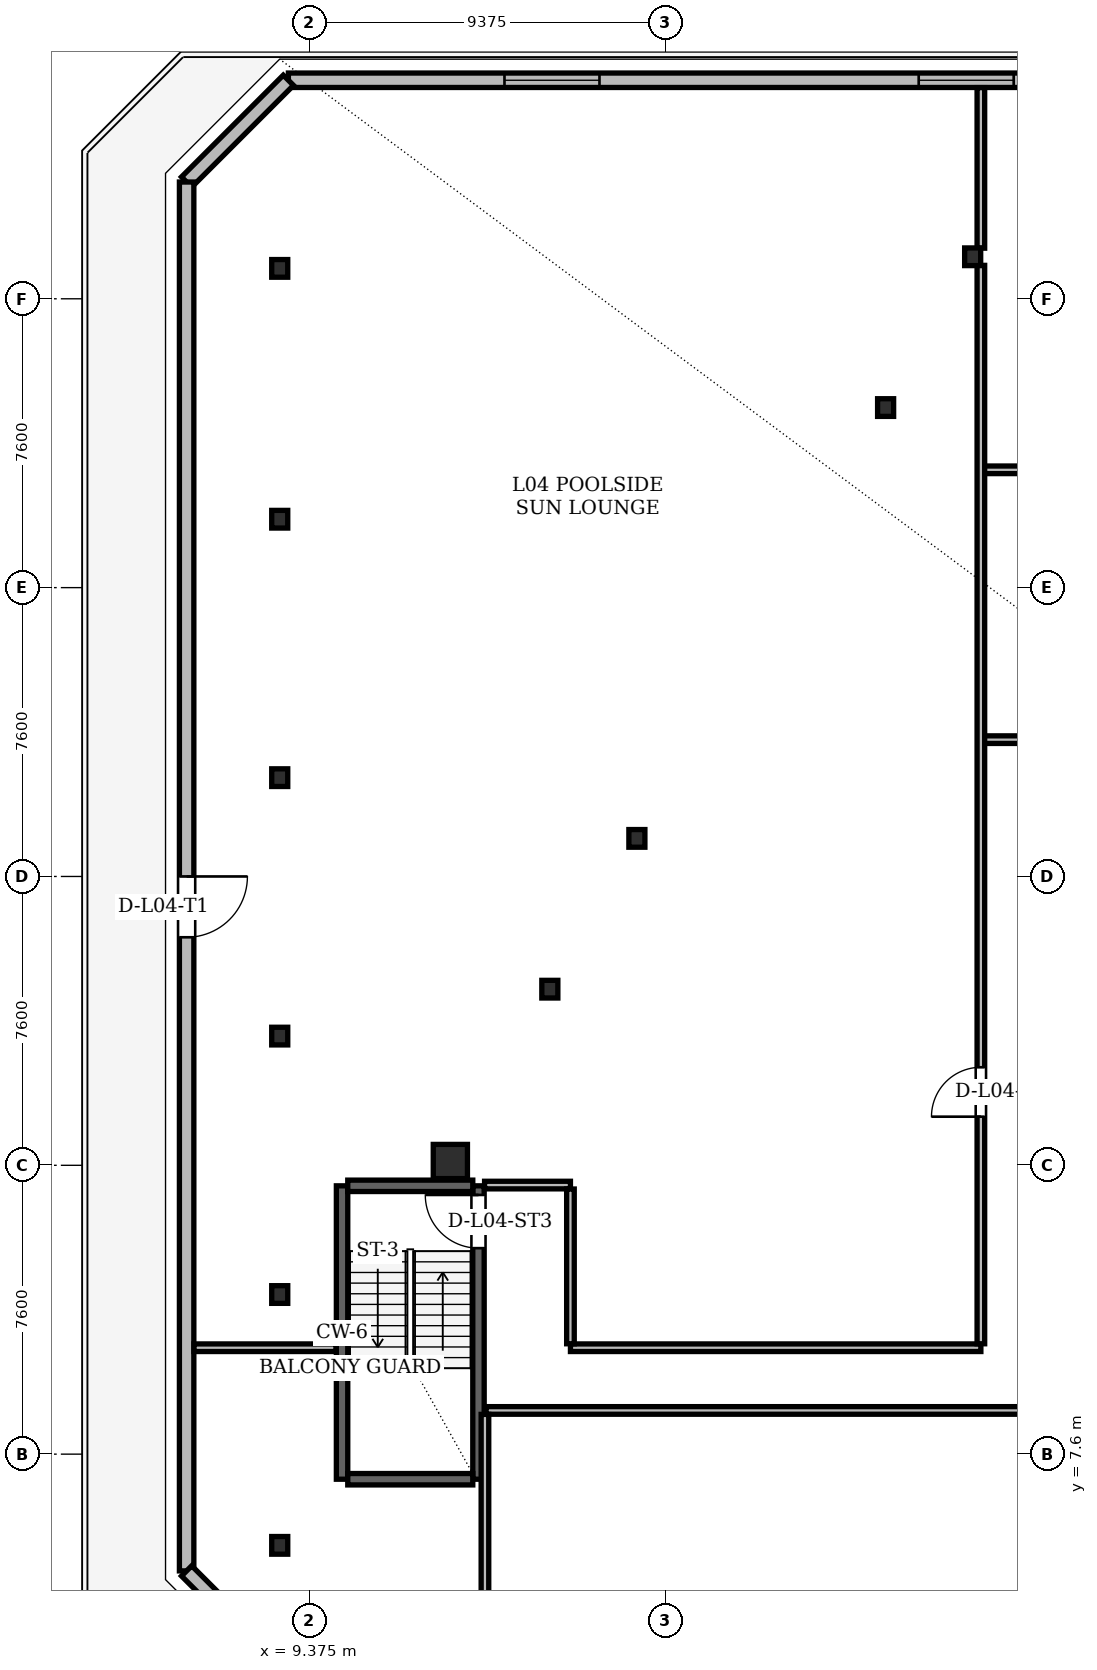
"""IFC4 building model, lengths in metres.
Left out: names, types, materials, properties, quantities, classifications, styles, units other than length and angle.
Written with IfcOpenShell. Run it as: python <this file> out.ifc"""

import sys

from ifc_helpers import new_model, si_unit, direction, frame, frame_2d, origin, origin_2d, place, context, subcontext, project, spatial, rectangle, hollow_rectangle, i_section, extrude, element, fill, save


model = new_model("IFC4")
c1 = context("Model", 3, precision=1e-05, world=origin(), true_north=direction((0.0, 1.0)))
c2 = subcontext(c1, "Body", "Model", "MODEL_VIEW")
j1 = project(units=[si_unit("LENGTHUNIT", "METRE"), si_unit("PLANEANGLEUNIT", "RADIAN")], contexts=[c1])
p1 = place(None, origin())
s1 = spatial("IfcSite", under=j1, at=p1, CompositionType="ELEMENT")
p2 = place(p1, origin())
s2 = spatial("IfcBuilding", under=s1, at=p2, CompositionType="ELEMENT")
p3 = place(p2, frame((0.0, 0.0, 18.3)))
s3 = spatial("IfcBuildingStorey", under=s2, at=p3, CompositionType="ELEMENT", Elevation=18.3)
p4 = place(p3, frame((13.09, 15.3, 0.004), z_axis=(0.0, 0.0, 1.0), x_axis=(1.0, 0.0, 0.0)))
e1 = element("IfcColumn", 1, at=p4, inside=s3, PredefinedType="COLUMN", context=c2, shape_type="SweptSolid", body=[
    extrude(hollow_rectangle(XDim=0.9, YDim=0.9, WallThickness=0.075, at=origin_2d()), origin(), (0.0, 0.0, 1.0), 4.191),
])
for number, where, z_axis, x_axis in (
    (2, (26.834, 39.106, 0.004), (0.0, 0.0, 1.0), (1.0, 0.0, 0.0)),
    (3, (24.543, 35.138, 0.004), (0.0, 0.0, 1.0), (1.0, 0.0, 0.0)),
    (4, (17.998, 23.802, 0.004), (0.0, 0.0, 1.0), (1.0, 0.0, 0.0)),
    (5, (15.708, 19.834, 0.004), (0.0, 0.0, 1.0), (1.0, 0.0, 0.0)),
):
    element("IfcColumn", number, at=place(p3, frame(where, z_axis=z_axis, x_axis=x_axis)), inside=s3, PredefinedType="COLUMN", context=c2, shape_type="SweptSolid", body=[
        extrude(i_section(OverallWidth=0.422, OverallDepth=0.465, WebThickness=0.045, FlangeThickness=0.072, at=origin_2d()), origin(), (0.0, 0.0, 1.0), 4.191),
    ])
for number, where, z_axis, x_axis in (
    (6, (8.6, 5.2, 0.0), (0.0, 0.0, 1.0), (1.0, 0.0, 0.0)),
    (7, (8.6, 11.8, 0.0), (0.0, 0.0, 1.0), (1.0, 0.0, 0.0)),
    (8, (8.6, 18.6, 0.0), (0.0, 0.0, 1.0), (1.0, 0.0, 0.0)),
    (9, (8.6, 25.4, 0.0), (0.0, 0.0, 1.0), (1.0, 0.0, 0.0)),
    (10, (8.6, 32.2, 0.0), (0.0, 0.0, 1.0), (1.0, 0.0, 0.0)),
    (11, (8.6, 38.8, 0.0), (0.0, 0.0, 1.0), (1.0, 0.0, 0.0)),
):
    element("IfcColumn", number, at=place(p3, frame(where, z_axis=z_axis, x_axis=x_axis)), inside=s3, PredefinedType="COLUMN", context=c2, shape_type="SweptSolid", body=[
        extrude(i_section(OverallWidth=0.422, OverallDepth=0.465, WebThickness=0.045, FlangeThickness=0.072, at=origin_2d()), origin(), (0.0, 0.0, 1.0), 4.2),
    ])
p5 = place(p3, frame((10.24, 6.94, 0.0), z_axis=(0.0, 0.0, 1.0), x_axis=(0.0, 1.0, 0.0)))
e12 = element("IfcWall", 12, at=p5, inside=s3, PredefinedType="SHEAR", context=c2, shape_type="SweptSolid", body=[
    extrude(rectangle(XDim=7.72, YDim=0.3, at=frame_2d((3.86, 0.0))), origin(), (0.0, 0.0, 1.0), 3.88),
])
p6 = place(p3, frame((13.83, 6.94, 0.0), z_axis=(0.0, 0.0, 1.0), x_axis=(0.0, 1.0, 0.0)))
e13 = element("IfcWall", 13, at=p6, inside=s3, PredefinedType="SHEAR", context=c2, shape_type="SweptSolid", body=[
    extrude(rectangle(XDim=7.72, YDim=0.3, at=frame_2d((3.86, 0.0))), origin(), (0.0, 0.0, 1.0), 3.88),
])
p7 = place(p6, frame((6.08, 0.0, 0.0)))
e14 = element("IfcOpeningElement", 14, at=p7, cuts=e13, PredefinedType="OPENING", context=c2, shape_type="SweptSolid", body=[
    extrude(rectangle(XDim=1.4, YDim=2.2, at=frame_2d((0.7, 1.1))), frame((0.0, 0.15, 0.0), z_axis=(0.0, -1.0, 0.0), x_axis=(1.0, 0.0, 0.0)), (0.0, 0.0, 1.0), 0.3),
])
for number, where, z_axis, x_axis in (
    (15, (10.39, 6.94, 0.0), (0.0, 0.0, 1.0), (1.0, 0.0, 0.0)),
    (16, (10.39, 14.66, 0.0), (0.0, 0.0, 1.0), (1.0, 0.0, 0.0)),
):
    element("IfcWall", number, at=place(p3, frame(where, z_axis=z_axis, x_axis=x_axis)), inside=s3, PredefinedType="SHEAR", context=c2, shape_type="SweptSolid", body=[
        extrude(rectangle(XDim=3.29, YDim=0.3, at=frame_2d((1.645, 0.0))), origin(), (0.0, 0.0, 1.0), 3.88),
    ])
p8 = place(p3, frame((33.6, 43.75, 0.0), z_axis=(0.0, 0.0, 1.0), x_axis=(-1.0, 0.0, 0.0)))
e17 = element("IfcWall", 17, at=p8, inside=s3, PredefinedType="SOLIDWALL", context=c2, shape_type="SweptSolid", body=[
    extrude(rectangle(XDim=24.772, YDim=0.38, at=frame_2d((12.386, 0.0))), origin(), (0.0, 0.0, 1.0), 2.943),
])
p9 = place(p8, frame((5.686, 0.0, 0.85)))
e18 = element("IfcOpeningElement", 18, at=p9, cuts=e17, PredefinedType="OPENING", context=c2, shape_type="SweptSolid", body=[
    extrude(rectangle(XDim=2.5, YDim=1.923, at=frame_2d((1.25, 0.961))), frame((0.0, 0.19, 0.0), z_axis=(0.0, -1.0, 0.0), x_axis=(1.0, 0.0, 0.0)), (0.0, 0.0, 1.0), 0.38),
])
p10 = place(p8, frame((16.586, 0.0, 0.85)))
e19 = element("IfcOpeningElement", 19, at=p10, cuts=e17, PredefinedType="OPENING", context=c2, shape_type="SweptSolid", body=[
    extrude(rectangle(XDim=2.5, YDim=1.923, at=frame_2d((1.25, 0.961))), frame((0.0, 0.19, 0.0), z_axis=(0.0, -1.0, 0.0), x_axis=(1.0, 0.0, 0.0)), (0.0, 0.0, 1.0), 0.38),
])
p11 = place(p3, frame((8.828, 43.75, 0.0), z_axis=(0.0, 0.0, 1.0), x_axis=(-0.707139013974, -0.707074546929, 0.0)))
e20 = element("IfcWall", 20, at=p11, inside=s3, PredefinedType="SOLIDWALL", context=c2, shape_type="SweptSolid", body=[
    extrude(rectangle(XDim=3.787, YDim=0.38, at=frame_2d((1.894, 0.0))), origin(), (0.0, 0.0, 1.0), 3.88),
])
p12 = place(p3, frame((6.15, 41.072, 0.0), z_axis=(0.0, 0.0, 1.0), x_axis=(0.0, -1.0, 0.0)))
e21 = element("IfcWall", 21, at=p12, inside=s3, PredefinedType="SOLIDWALL", context=c2, shape_type="SweptSolid", body=[
    extrude(rectangle(XDim=36.544, YDim=0.38, at=frame_2d((18.272, 0.0))), origin(), (0.0, 0.0, 1.0), 3.88),
])
p13 = place(p12, frame((18.272, 0.0, 0.0)))
e22 = element("IfcOpeningElement", 22, at=p13, cuts=e21, PredefinedType="OPENING", context=c2, shape_type="SweptSolid", body=[
    extrude(rectangle(XDim=1.6, YDim=2.2, at=frame_2d((0.8, 1.1))), frame((0.0, 0.19, 0.0), z_axis=(0.0, -1.0, 0.0), x_axis=(1.0, 0.0, 0.0)), (0.0, 0.0, 1.0), 0.38),
])
p14 = place(p3, frame((6.15, 4.528, 0.0), z_axis=(0.0, 0.0, 1.0), x_axis=(0.707139013974, -0.707074546929, 0.0)))
e23 = element("IfcWall", 23, at=p14, inside=s3, PredefinedType="SOLIDWALL", context=c2, shape_type="SweptSolid", body=[
    extrude(rectangle(XDim=3.787, YDim=0.38, at=frame_2d((1.894, 0.0))), origin(), (0.0, 0.0, 1.0), 3.88),
])
p15 = place(p3, frame((14.03, 8.75, 0.0), z_axis=(0.0, 0.0, 1.0), x_axis=(1.0, 0.0, 0.0)))
e24 = element("IfcWall", 24, at=p15, inside=s3, PredefinedType="PARTITIONING", context=c2, shape_type="SweptSolid", body=[
    extrude(rectangle(XDim=41.57, YDim=0.2, at=frame_2d((20.785, 0.0))), origin(), (0.0, 0.0, 1.0), 2.943),
])
p16 = place(p15, frame((20.035, 0.0, 0.0)))
e25 = element("IfcOpeningElement", 25, at=p16, cuts=e24, PredefinedType="OPENING", context=c2, shape_type="SweptSolid", body=[
    extrude(rectangle(XDim=1.3, YDim=2.2, at=frame_2d((0.65, 1.1))), frame((0.0, 0.1, 0.0), z_axis=(0.0, -1.0, 0.0), x_axis=(1.0, 0.0, 0.0)), (0.0, 0.0, 1.0), 0.2),
])
p17 = place(p3, frame((6.344, 10.4, 0.0), z_axis=(0.0, 0.0, 1.0), x_axis=(1.0, 0.0, 0.0)))
e26 = element("IfcWall", 26, at=p17, inside=s3, PredefinedType="PARTITIONING", context=c2, shape_type="SweptSolid", body=[
    extrude(rectangle(XDim=3.736, YDim=0.2, at=frame_2d((1.868, 0.0))), origin(), (0.0, 0.0, 1.0), 2.943),
])
p18 = place(p3, frame((16.25, 10.4, 0.0), z_axis=(0.0, 0.0, 1.0), x_axis=(1.0, 0.0, 0.0)))
e27 = element("IfcWall", 27, at=p18, inside=s3, PredefinedType="PARTITIONING", context=c2, shape_type="SweptSolid", body=[
    extrude(rectangle(XDim=10.8, YDim=0.2, at=frame_2d((5.4, 0.0))), origin(), (0.0, 0.0, 1.0), 3.88),
])
p19 = place(p3, frame((13.99, 14.68, 0.0), z_axis=(0.0, 0.0, 1.0), x_axis=(1.0, 0.0, 0.0)))
e28 = element("IfcWall", 28, at=p19, inside=s3, PredefinedType="PARTITIONING", context=c2, shape_type="SweptSolid", body=[
    extrude(rectangle(XDim=2.26, YDim=0.2, at=frame_2d((1.13, 0.0))), origin(), (0.0, 0.0, 1.0), 2.943),
])
p20 = place(p3, frame((27.05, 26.4, 0.0), z_axis=(0.0, 0.0, 1.0), x_axis=(1.0, 0.0, 0.0)))
e29 = element("IfcWall", 29, at=p20, inside=s3, PredefinedType="PARTITIONING", context=c2, shape_type="SweptSolid", body=[
    extrude(rectangle(XDim=28.55, YDim=0.2, at=frame_2d((14.275, 0.0))), origin(), (0.0, 0.0, 1.0), 2.943),
])
p21 = place(p20, frame((2.885, 0.0, 0.0)))
e30 = element("IfcOpeningElement", 30, at=p21, cuts=e29, PredefinedType="OPENING", context=c2, shape_type="SweptSolid", body=[
    extrude(rectangle(XDim=0.88, YDim=2.08, at=frame_2d((0.44, 1.04))), frame((0.0, 0.1, 0.0), z_axis=(0.0, -1.0, 0.0), x_axis=(1.0, 0.0, 0.0)), (0.0, 0.0, 1.0), 0.2),
])
p22 = place(p20, frame((8.964, 0.0, 0.0)))
e31 = element("IfcOpeningElement", 31, at=p22, cuts=e29, PredefinedType="OPENING", context=c2, shape_type="SweptSolid", body=[
    extrude(rectangle(XDim=0.88, YDim=2.08, at=frame_2d((0.44, 1.04))), frame((0.0, 0.1, 0.0), z_axis=(0.0, -1.0, 0.0), x_axis=(1.0, 0.0, 0.0)), (0.0, 0.0, 1.0), 0.2),
])
p23 = place(p20, frame((14.688, 0.0, 0.0)))
e32 = element("IfcOpeningElement", 32, at=p23, cuts=e29, PredefinedType="OPENING", context=c2, shape_type="SweptSolid", body=[
    extrude(rectangle(XDim=0.88, YDim=2.08, at=frame_2d((0.44, 1.04))), frame((0.0, 0.1, 0.0), z_axis=(0.0, -1.0, 0.0), x_axis=(1.0, 0.0, 0.0)), (0.0, 0.0, 1.0), 0.2),
])
p24 = place(p3, frame((27.05, 33.5, 0.0), z_axis=(0.0, 0.0, 1.0), x_axis=(1.0, 0.0, 0.0)))
e33 = element("IfcWall", 33, at=p24, inside=s3, PredefinedType="PARTITIONING", context=c2, shape_type="SweptSolid", body=[
    extrude(rectangle(XDim=12.95, YDim=0.2, at=frame_2d((6.475, 0.0))), origin(), (0.0, 0.0, 1.0), 2.943),
])
p25 = place(p3, frame((14.0, 2.044, 0.0), z_axis=(0.0, 0.0, 1.0), x_axis=(0.0, 1.0, 0.0)))
e34 = element("IfcWall", 34, at=p25, inside=s3, PredefinedType="PARTITIONING", context=c2, shape_type="SweptSolid", body=[
    extrude(rectangle(XDim=6.602, YDim=0.2, at=frame_2d((3.301, 0.0))), origin(), (0.0, 0.0, 1.0), 3.88),
])
p26 = place(p3, frame((16.25, 10.504, 0.0), z_axis=(0.0, 0.0, 1.0), x_axis=(0.0, 1.0, 0.0)))
e35 = element("IfcWall", 35, at=p26, inside=s3, PredefinedType="PARTITIONING", context=c2, shape_type="SweptSolid", body=[
    extrude(rectangle(XDim=4.072, YDim=0.2, at=frame_2d((2.036, 0.0))), origin(), (0.0, 0.0, 1.0), 2.943),
])
p27 = place(p3, frame((27.05, 10.504, 0.0), z_axis=(0.0, 0.0, 1.0), x_axis=(0.0, 1.0, 0.0)))
e36 = element("IfcWall", 36, at=p27, inside=s3, PredefinedType="PARTITIONING", context=c2, shape_type="SweptSolid", body=[
    extrude(rectangle(XDim=28.376, YDim=0.2, at=frame_2d((14.188, 0.0))), origin(), (0.0, 0.0, 1.0), 2.943),
])
p28 = place(p27, frame((5.975, 0.0, 0.0)))
e37 = element("IfcOpeningElement", 37, at=p28, cuts=e36, PredefinedType="OPENING", context=c2, shape_type="SweptSolid", body=[
    extrude(rectangle(XDim=1.3, YDim=2.2, at=frame_2d((0.65, 1.1))), frame((0.0, 0.1, 0.0), z_axis=(0.0, -1.0, 0.0), x_axis=(1.0, 0.0, 0.0)), (0.0, 0.0, 1.0), 0.2),
])
p29 = place(p3, frame((27.05, 39.332, 0.0), z_axis=(0.0, 0.0, 1.0), x_axis=(0.0, 1.0, 0.0)))
e38 = element("IfcWall", 38, at=p29, inside=s3, PredefinedType="PARTITIONING", context=c2, shape_type="SweptSolid", body=[
    extrude(rectangle(XDim=4.224, YDim=0.2, at=frame_2d((2.112, 0.0))), origin(), (0.0, 0.0, 1.0), 3.014),
])
p30 = place(p9, origin())
e39 = element("IfcWindow", 39, at=p30, inside=s3, PartitioningType="SINGLE_PANEL", PredefinedType="WINDOW", context=c2, shape_type="SweptSolid", body=[
    extrude(rectangle(XDim=2.5, YDim=1.923, at=frame_2d((1.25, 0.961))), frame((0.0, 0.03, 0.0), z_axis=(0.0, -1.0, 0.0), x_axis=(1.0, 0.0, 0.0)), (0.0, 0.0, 1.0), 0.06),
])
fill(e18, e39)
p31 = place(p10, origin())
e40 = element("IfcWindow", 40, at=p31, inside=s3, PartitioningType="SINGLE_PANEL", PredefinedType="WINDOW", context=c2, shape_type="SweptSolid", body=[
    extrude(rectangle(XDim=2.5, YDim=1.923, at=frame_2d((1.25, 0.961))), frame((0.0, 0.03, 0.0), z_axis=(0.0, -1.0, 0.0), x_axis=(1.0, 0.0, 0.0)), (0.0, 0.0, 1.0), 0.06),
])
fill(e19, e40)
p32 = place(p13, origin())
e41 = element("IfcDoor", 41, at=p32, inside=s3, OperationType="SINGLE_SWING_LEFT", PredefinedType="DOOR", context=c2, shape_type="SweptSolid", body=[
    extrude(rectangle(XDim=1.6, YDim=2.2, at=frame_2d((0.8, 1.1))), frame((0.0, 0.025, 0.0), z_axis=(0.0, -1.0, 0.0), x_axis=(1.0, 0.0, 0.0)), (0.0, 0.0, 1.0), 0.05),
])
fill(e22, e41)
p33 = place(p7, origin())
e42 = element("IfcDoor", 42, at=p33, inside=s3, OperationType="SINGLE_SWING_RIGHT", PredefinedType="DOOR", context=c2, shape_type="SweptSolid", body=[
    extrude(rectangle(XDim=1.4, YDim=2.2, at=frame_2d((0.7, 1.1))), frame((0.0, 0.025, 0.0), z_axis=(0.0, -1.0, 0.0), x_axis=(1.0, 0.0, 0.0)), (0.0, 0.0, 1.0), 0.05),
])
fill(e14, e42)
p34 = place(p28, origin())
e43 = element("IfcDoor", 43, at=p34, inside=s3, OperationType="SINGLE_SWING_LEFT", PredefinedType="DOOR", context=c2, shape_type="SweptSolid", body=[
    extrude(rectangle(XDim=1.3, YDim=2.2, at=frame_2d((0.65, 1.1))), frame((0.0, 0.025, 0.0), z_axis=(0.0, -1.0, 0.0), x_axis=(1.0, 0.0, 0.0)), (0.0, 0.0, 1.0), 0.05),
])
fill(e37, e43)
save(model, sys.argv[1])
